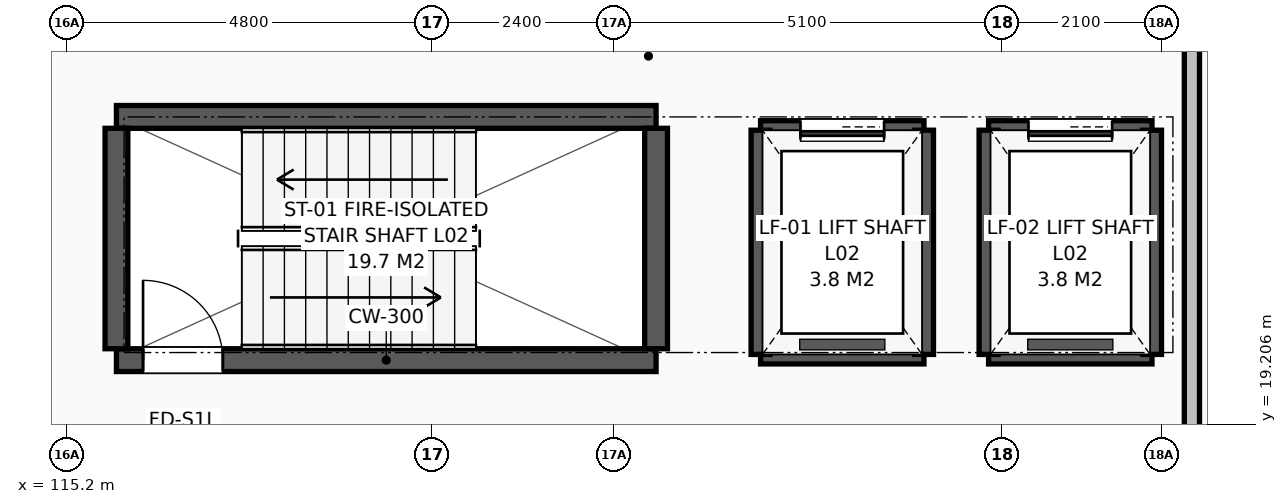
"""IFC4 building model, lengths in metres.
Left out: names, types, materials, properties, quantities, classifications, styles, units other than length and angle.
Written with IfcOpenShell. Run it as: python <this file> out.ifc"""

import sys

from ifc_helpers import new_model, si_unit, direction, frame, frame_2d, origin, place, context, subcontext, project, spatial, rectangle, extrude, element, fill, save


model = new_model("IFC4")
c1 = context("Model", 3, precision=1e-05, world=origin(), true_north=direction((0.0, 1.0)))
c2 = subcontext(c1, "Body", "Model", "MODEL_VIEW")
j1 = project(units=[si_unit("LENGTHUNIT", "METRE"), si_unit("PLANEANGLEUNIT", "RADIAN")], contexts=[c1])
p1 = place(None, origin())
s1 = spatial("IfcSite", under=j1, at=p1, CompositionType="ELEMENT")
p2 = place(p1, origin())
s2 = spatial("IfcBuilding", under=s1, at=p2, CompositionType="ELEMENT")
p3 = place(p2, frame((0.0, 0.0, 9.0)))
s3 = spatial("IfcBuildingStorey", under=s2, at=p3, CompositionType="ELEMENT", Elevation=9.0)
p4 = place(p3, frame((115.85, 20.05, 0.0), z_axis=(0.0, 0.0, 1.0), x_axis=(1.0, 0.0, 0.0)))
e1 = element("IfcWall", 1, at=p4, inside=s3, PredefinedType="SHEAR", context=c2, shape_type="SweptSolid", body=[
    extrude(rectangle(XDim=7.1, YDim=0.3, at=frame_2d((3.55, 0.0))), origin(), (0.0, 0.0, 1.0), 3.875),
])
p5 = place(p4, frame((0.35, 0.0, 0.0)))
e2 = element("IfcOpeningElement", 2, at=p5, cuts=e1, PredefinedType="OPENING", context=c2, shape_type="SweptSolid", body=[
    extrude(rectangle(XDim=1.05, YDim=2.15, at=frame_2d((0.525, 1.075))), frame((0.0, 0.16, 0.0), z_axis=(0.0, -1.0, 0.0), x_axis=(1.0, 0.0, 0.0)), (0.0, 0.0, 1.0), 0.32),
])
p6 = place(p3, frame((122.95, 23.25, 0.0), z_axis=(0.0, 0.0, 1.0), x_axis=(-1.0, 0.0, 0.0)))
e3 = element("IfcWall", 3, at=p6, inside=s3, PredefinedType="SHEAR", context=c2, shape_type="SweptSolid", body=[
    extrude(rectangle(XDim=7.1, YDim=0.3, at=frame_2d((3.55, 0.0))), origin(), (0.0, 0.0, 1.0), 3.875),
])
for number, where, z_axis, x_axis in (
    (4, (122.95, 20.2, 0.0), (0.0, 0.0, 1.0), (0.0, 1.0, 0.0)),
    (5, (115.85, 23.1, 0.0), (0.0, 0.0, 1.0), (0.0, -1.0, 0.0)),
):
    element("IfcWall", number, at=place(p3, frame(where, z_axis=z_axis, x_axis=x_axis)), inside=s3, PredefinedType="SHEAR", context=c2, shape_type="SweptSolid", body=[
        extrude(rectangle(XDim=2.9, YDim=0.3, at=frame_2d((1.45, 0.0))), origin(), (0.0, 0.0, 1.0), 3.875),
    ])
p7 = place(p3, frame((124.325, 20.125, 0.0), z_axis=(0.0, 0.0, 1.0), x_axis=(1.0, 0.0, 0.0)))
e6 = element("IfcWall", 6, at=p7, inside=s3, PredefinedType="SHEAR", context=c2, shape_type="SweptSolid", body=[
    extrude(rectangle(XDim=2.15, YDim=0.25, at=frame_2d((1.075, 0.0))), origin(), (0.0, 0.0, 1.0), 3.9),
])
p8 = place(p3, frame((126.475, 23.075, 0.0), z_axis=(0.0, 0.0, 1.0), x_axis=(-1.0, 0.0, 0.0)))
e7 = element("IfcWall", 7, at=p8, inside=s3, PredefinedType="SHEAR", context=c2, shape_type="SweptSolid", body=[
    extrude(rectangle(XDim=2.15, YDim=0.25, at=frame_2d((1.075, 0.0))), origin(), (0.0, 0.0, 1.0), 3.9),
])
p9 = place(p8, frame((0.525, 0.0, 0.0)))
e8 = element("IfcOpeningElement", 8, at=p9, cuts=e7, PredefinedType="OPENING", context=c2, shape_type="SweptSolid", body=[
    extrude(rectangle(XDim=1.1, YDim=2.15, at=frame_2d((0.55, 1.075))), frame((0.0, 0.135, 0.0), z_axis=(0.0, -1.0, 0.0), x_axis=(1.0, 0.0, 0.0)), (0.0, 0.0, 1.0), 0.27),
])
for number, where, z_axis, x_axis in (
    (9, (124.325, 23.075, 0.0), (0.0, 0.0, 1.0), (0.0, -1.0, 0.0)),
    (10, (126.475, 20.125, 0.0), (0.0, 0.0, 1.0), (0.0, 1.0, 0.0)),
):
    element("IfcWall", number, at=place(p3, frame(where, z_axis=z_axis, x_axis=x_axis)), inside=s3, PredefinedType="SHEAR", context=c2, shape_type="SweptSolid", body=[
        extrude(rectangle(XDim=2.95, YDim=0.25, at=frame_2d((1.475, 0.0))), origin(), (0.0, 0.0, 1.0), 3.9),
    ])
p10 = place(p3, frame((127.325, 20.125, 0.0), z_axis=(0.0, 0.0, 1.0), x_axis=(1.0, 0.0, 0.0)))
e11 = element("IfcWall", 11, at=p10, inside=s3, PredefinedType="SHEAR", context=c2, shape_type="SweptSolid", body=[
    extrude(rectangle(XDim=2.15, YDim=0.25, at=frame_2d((1.075, 0.0))), origin(), (0.0, 0.0, 1.0), 3.9),
])
p11 = place(p3, frame((129.475, 23.075, 0.0), z_axis=(0.0, 0.0, 1.0), x_axis=(-1.0, 0.0, 0.0)))
e12 = element("IfcWall", 12, at=p11, inside=s3, PredefinedType="SHEAR", context=c2, shape_type="SweptSolid", body=[
    extrude(rectangle(XDim=2.15, YDim=0.25, at=frame_2d((1.075, 0.0))), origin(), (0.0, 0.0, 1.0), 3.9),
])
p12 = place(p11, frame((0.525, 0.0, 0.0)))
e13 = element("IfcOpeningElement", 13, at=p12, cuts=e12, PredefinedType="OPENING", context=c2, shape_type="SweptSolid", body=[
    extrude(rectangle(XDim=1.1, YDim=2.15, at=frame_2d((0.55, 1.075))), frame((0.0, 0.135, 0.0), z_axis=(0.0, -1.0, 0.0), x_axis=(1.0, 0.0, 0.0)), (0.0, 0.0, 1.0), 0.27),
])
for number, where, z_axis, x_axis in (
    (14, (127.325, 23.075, 0.0), (0.0, 0.0, 1.0), (0.0, -1.0, 0.0)),
    (15, (129.475, 20.125, 0.0), (0.0, 0.0, 1.0), (0.0, 1.0, 0.0)),
):
    element("IfcWall", number, at=place(p3, frame(where, z_axis=z_axis, x_axis=x_axis)), inside=s3, PredefinedType="SHEAR", context=c2, shape_type="SweptSolid", body=[
        extrude(rectangle(XDim=2.95, YDim=0.25, at=frame_2d((1.475, 0.0))), origin(), (0.0, 0.0, 1.0), 3.9),
    ])
p13 = place(p3, frame((130.0, 31.35, 0.0), z_axis=(0.0, 0.0, 1.0), x_axis=(0.0, -1.0, 0.0)))
e16 = element("IfcWall", 16, at=p13, inside=s3, PredefinedType="SOLIDWALL", context=c2, shape_type="SweptSolid", body=[
    extrude(rectangle(XDim=12.95, YDim=0.2, at=frame_2d((6.475, 0.0))), origin(), (0.0, 0.0, 1.0), 3.257),
])
p14 = place(p5, origin())
e17 = element("IfcDoor", 17, at=p14, inside=s3, OperationType="SINGLE_SWING_LEFT", PredefinedType="DOOR", context=c2, shape_type="SweptSolid", body=[
    extrude(rectangle(XDim=1.05, YDim=2.15, at=frame_2d((0.525, 1.075))), frame((0.0, 0.025, 0.0), z_axis=(0.0, -1.0, 0.0), x_axis=(1.0, 0.0, 0.0)), (0.0, 0.0, 1.0), 0.05),
])
fill(e2, e17)
p15 = place(p9, origin())
e18 = element("IfcDoor", 18, at=p15, inside=s3, OperationType="SLIDING_TO_LEFT", PredefinedType="DOOR", context=c2, shape_type="SweptSolid", body=[
    extrude(rectangle(XDim=1.1, YDim=2.15, at=frame_2d((0.55, 1.075))), frame((0.0, 0.025, 0.0), z_axis=(0.0, -1.0, 0.0), x_axis=(1.0, 0.0, 0.0)), (0.0, 0.0, 1.0), 0.05),
])
fill(e8, e18)
p16 = place(p12, origin())
e19 = element("IfcDoor", 19, at=p16, inside=s3, OperationType="SLIDING_TO_LEFT", PredefinedType="DOOR", context=c2, shape_type="SweptSolid", body=[
    extrude(rectangle(XDim=1.1, YDim=2.15, at=frame_2d((0.55, 1.075))), frame((0.0, 0.025, 0.0), z_axis=(0.0, -1.0, 0.0), x_axis=(1.0, 0.0, 0.0)), (0.0, 0.0, 1.0), 0.05),
])
fill(e13, e19)
save(model, sys.argv[1])
